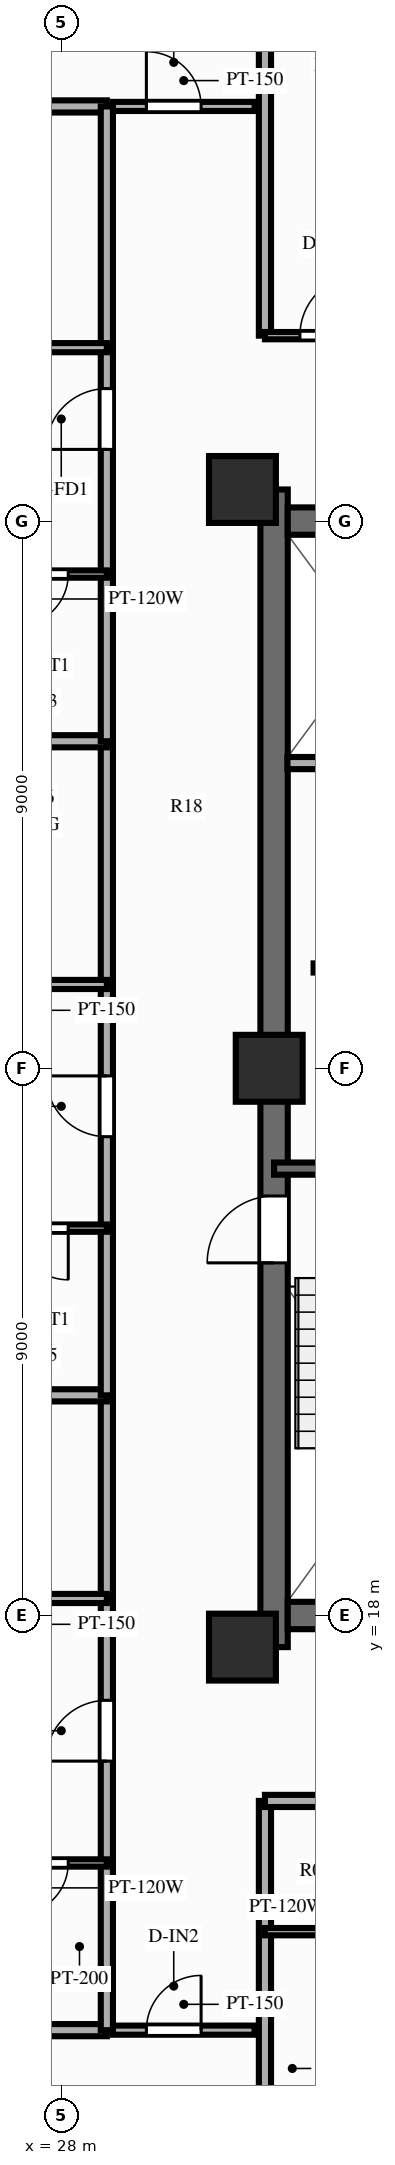
"""IFC4 building model, lengths in metres.
Left out: names, types, materials, properties, quantities, classifications, styles, units other than length and angle.
Written with IfcOpenShell. Run it as: python <this file> out.ifc"""

import sys

from ifc_helpers import new_model, si_unit, direction, frame, frame_2d, origin, origin_2d, place, context, subcontext, project, spatial, rectangle, extrude, source, transform, mapped, element, fill, save


model = new_model("IFC4")
c1 = context("Model", 3, precision=1e-05, world=origin(), true_north=direction((0.0, 1.0)))
c2 = subcontext(c1, "Body", "Model", "MODEL_VIEW")
j1 = project(units=[si_unit("LENGTHUNIT", "METRE"), si_unit("PLANEANGLEUNIT", "RADIAN")], contexts=[c1])
p1 = place(None, origin())
s1 = spatial("IfcSite", under=j1, at=p1, CompositionType="ELEMENT")
p2 = place(p1, origin())
s2 = spatial("IfcBuilding", under=s1, at=p2, CompositionType="ELEMENT")
p3 = place(p2, frame((0.0, 0.0, 172.9)))
s3 = spatial("IfcBuildingStorey", under=s2, at=p3, CompositionType="ELEMENT", Elevation=172.9)
p4 = place(p3, frame((31.5, 17.48, 0.0), z_axis=(0.0, 0.0, 1.0), x_axis=(0.0, 1.0, 0.0)))
e1 = element("IfcWall", 1, at=p4, inside=s3, PredefinedType="SHEAR", context=c2, shape_type="SweptSolid", body=[
    extrude(rectangle(XDim=19.04, YDim=0.45, at=frame_2d((9.52, 0.0))), origin(), (0.0, 0.0, 1.0), 3.9),
])
p5 = place(p4, frame((6.32, 0.0, 0.0)))
e2 = element("IfcOpeningElement", 2, at=p5, cuts=e1, PredefinedType="OPENING", context=c2, shape_type="SweptSolid", body=[
    extrude(rectangle(XDim=1.1, YDim=2.15, at=frame_2d((0.55, 1.075))), frame((0.0, 0.237, 0.0), z_axis=(0.0, -1.0, 0.0), x_axis=(1.0, 0.0, 0.0)), (0.0, 0.0, 1.0), 0.474),
])
p6 = place(p3, frame((31.725, 18.0, 0.0), z_axis=(0.0, 0.0, 1.0), x_axis=(1.0, 0.0, 0.0)))
e3 = element("IfcWall", 3, at=p6, inside=s3, PredefinedType="SHEAR", context=c2, shape_type="SweptSolid", body=[
    extrude(rectangle(XDim=12.55, YDim=0.45, at=frame_2d((6.275, 0.0))), origin(), (0.0, 0.0, 1.0), 3.9),
])
p7 = place(p3, frame((31.725, 36.0, 0.0), z_axis=(0.0, 0.0, 1.0), x_axis=(1.0, 0.0, 0.0)))
e4 = element("IfcWall", 4, at=p7, inside=s3, PredefinedType="SHEAR", context=c2, shape_type="SweptSolid", body=[
    extrude(rectangle(XDim=12.55, YDim=0.45, at=frame_2d((6.275, 0.0))), origin(), (0.0, 0.0, 1.0), 3.9),
])
p8 = place(p7, frame((5.225, 0.0, 0.0), z_axis=(0.0, 0.0, 1.0), x_axis=(-1.0, 0.0, 0.0)))
e5 = element("IfcOpeningElement", 5, at=p8, cuts=e4, PredefinedType="OPENING", context=c2, shape_type="SweptSolid", body=[
    extrude(rectangle(XDim=1.4, YDim=2.15, at=frame_2d((0.7, 1.075))), frame((0.0, 0.237, 0.0), z_axis=(0.0, -1.0, 0.0), x_axis=(1.0, 0.0, 0.0)), (0.0, 0.0, 1.0), 0.474),
])
m1 = source(origin(), c2, "Body", "SweptSolid", [
    extrude(rectangle(XDim=1.1, YDim=1.1, at=origin_2d()), origin(), (0.0, 0.0, 1.0), 3.9),
])
for number, where, z_axis, x_axis in (
    (6, (30.98, 17.48, 0.0), (0.0, 0.0, 1.0), (1.0, 0.0, 0.0)),
    (7, (30.98, 36.52, 0.0), (0.0, 0.0, 1.0), (1.0, 0.0, 0.0)),
    (8, (31.42, 27.0, 0.0), (0.0, 0.0, 1.0), (1.0, 0.0, 0.0)),
):
    element("IfcColumn", number, at=place(p3, frame(where, z_axis=z_axis, x_axis=x_axis)), inside=s3, PredefinedType="COLUMN", context=c2, shape_type="MappedRepresentation", body=[
        mapped(m1, transform((0.0, 0.0, 0.0), scale=1.0)),
    ])
p9 = place(p3, frame((32.15, 28.65, 0.0), z_axis=(0.0, 0.0, 1.0), x_axis=(1.0, 0.0, 0.0)))
e9 = element("IfcWall", 9, at=p9, inside=s3, PredefinedType="PARTITIONING", context=c2, shape_type="SweptSolid", body=[
    extrude(rectangle(XDim=2.27, YDim=0.15, at=frame_2d((1.135, 0.0))), origin(), (0.0, 0.0, 1.0), 3.04),
])
p10 = place(p3, frame((31.5, 25.35, 0.0), z_axis=(0.0, 0.0, 1.0), x_axis=(1.0, 0.0, 0.0)))
e10 = element("IfcWall", 10, at=p10, inside=s3, PredefinedType="SOLIDWALL", context=c2, shape_type="SweptSolid", body=[
    extrude(rectangle(XDim=3.93, YDim=0.2, at=frame_2d((1.965, 0.0))), origin(), (0.0, 0.0, 1.0), 3.69),
])
p11 = place(p3, frame((31.72, 32.02, 0.0), z_axis=(0.0, 0.0, 1.0), x_axis=(1.0, 0.0, 0.0)))
e11 = element("IfcWall", 11, at=p11, inside=s3, PredefinedType="PARTITIONING", context=c2, shape_type="SweptSolid", body=[
    extrude(rectangle(XDim=2.8, YDim=0.2, at=frame_2d((1.4, 0.0))), origin(), (0.0, 0.0, 1.0), 3.69),
])
p12 = place(p3, frame((28.85, 11.18, 0.0), z_axis=(0.0, 0.0, 1.0), x_axis=(1.0, 0.0, 0.0)))
e12 = element("IfcWall", 12, at=p12, inside=s3, PredefinedType="PARTITIONING", context=c2, shape_type="SweptSolid", body=[
    extrude(rectangle(XDim=2.33, YDim=0.15, at=frame_2d((1.165, 0.0))), origin(), (0.0, 0.0, 1.0), 3.69),
])
p13 = place(p12, frame((0.55, 0.0, 0.0)))
e13 = element("IfcOpeningElement", 13, at=p13, cuts=e12, PredefinedType="OPENING", context=c2, shape_type="SweptSolid", body=[
    extrude(rectangle(XDim=0.9, YDim=2.1, at=frame_2d((0.45, 1.05))), frame((0.0, 0.087, 0.0), z_axis=(0.0, -1.0, 0.0), x_axis=(1.0, 0.0, 0.0)), (0.0, 0.0, 1.0), 0.174),
])
p14 = place(p3, frame((28.85, 42.82, 0.0), z_axis=(0.0, 0.0, 1.0), x_axis=(1.0, 0.0, 0.0)))
e14 = element("IfcWall", 14, at=p14, inside=s3, PredefinedType="PARTITIONING", context=c2, shape_type="SweptSolid", body=[
    extrude(rectangle(XDim=2.33, YDim=0.15, at=frame_2d((1.165, 0.0))), origin(), (0.0, 0.0, 1.0), 3.69),
])
p15 = place(p14, frame((0.55, 0.0, 0.0)))
e15 = element("IfcOpeningElement", 15, at=p15, cuts=e14, PredefinedType="OPENING", context=c2, shape_type="SweptSolid", body=[
    extrude(rectangle(XDim=0.9, YDim=2.1, at=frame_2d((0.45, 1.05))), frame((0.0, 0.087, 0.0), z_axis=(0.0, -1.0, 0.0), x_axis=(1.0, 0.0, 0.0)), (0.0, 0.0, 1.0), 0.174),
])
p16 = place(p3, frame((31.35, 14.95, 0.0), z_axis=(0.0, 0.0, 1.0), x_axis=(0.0, -1.0, 0.0)))
e16 = element("IfcWall", 16, at=p16, inside=s3, PredefinedType="PARTITIONING", context=c2, shape_type="SweptSolid", body=[
    extrude(rectangle(XDim=8.8, YDim=0.2, at=frame_2d((4.4, 0.0))), origin(), (0.0, 0.0, 1.0), 2.79),
])
p17 = place(p3, frame((31.35, 14.95, 0.0), z_axis=(0.0, 0.0, 1.0), x_axis=(1.0, 0.0, 0.0)))
e17 = element("IfcWall", 17, at=p17, inside=s3, PredefinedType="PARTITIONING", context=c2, shape_type="SweptSolid", body=[
    extrude(rectangle(XDim=2.85, YDim=0.2, at=frame_2d((1.425, 0.0))), origin(), (0.0, 0.0, 1.0), 3.69),
])
p18 = place(p3, frame((31.35, 12.8, 0.0), z_axis=(0.0, 0.0, 1.0), x_axis=(1.0, 0.0, 0.0)))
e18 = element("IfcWall", 18, at=p18, inside=s3, PredefinedType="PARTITIONING", context=c2, shape_type="SweptSolid", body=[
    extrude(rectangle(XDim=2.85, YDim=0.12, at=frame_2d((1.425, 0.0))), origin(), (0.0, 0.0, 1.0), 3.69),
])
p19 = place(p3, frame((31.35, 39.05, 0.0), z_axis=(0.0, 0.0, 1.0), x_axis=(0.0, 1.0, 0.0)))
e19 = element("IfcWall", 19, at=p19, inside=s3, PredefinedType="PARTITIONING", context=c2, shape_type="SweptSolid", body=[
    extrude(rectangle(XDim=8.8, YDim=0.2, at=frame_2d((4.4, 0.0))), origin(), (0.0, 0.0, 1.0), 2.79),
])
p20 = place(p3, frame((31.35, 39.05, 0.0), z_axis=(0.0, 0.0, 1.0), x_axis=(1.0, 0.0, 0.0)))
e20 = element("IfcWall", 20, at=p20, inside=s3, PredefinedType="PARTITIONING", context=c2, shape_type="SweptSolid", body=[
    extrude(rectangle(XDim=2.15, YDim=0.12, at=frame_2d((1.075, 0.0))), origin(), (0.0, 0.0, 1.0), 3.69),
])
p21 = place(p20, frame((0.575, 0.0, 0.0)))
e21 = element("IfcOpeningElement", 21, at=p21, cuts=e20, PredefinedType="OPENING", context=c2, shape_type="SweptSolid", body=[
    extrude(rectangle(XDim=1.0, YDim=2.1, at=frame_2d((0.5, 1.05))), frame((0.0, 0.072, 0.0), z_axis=(0.0, -1.0, 0.0), x_axis=(1.0, 0.0, 0.0)), (0.0, 0.0, 1.0), 0.144),
])
for number, where, z_axis, x_axis in (
    (22, (28.75, 11.18, 0.0), (0.0, 0.0, 1.0), (-1.0, 0.0, 0.0)),
    (23, (28.75, 42.82, 0.0), (0.0, 0.0, 1.0), (-1.0, 0.0, 0.0)),
):
    element("IfcWall", number, at=place(p3, frame(where, z_axis=z_axis, x_axis=x_axis)), inside=s3, PredefinedType="PARTITIONING", context=c2, shape_type="SweptSolid", body=[
        extrude(rectangle(XDim=10.85, YDim=0.2, at=frame_2d((5.425, 0.0))), origin(), (0.0, 0.0, 1.0), 3.69),
    ])
p22 = place(p3, frame((28.75, 11.18, 0.0), z_axis=(0.0, 0.0, 1.0), x_axis=(0.0, 1.0, 0.0)))
e24 = element("IfcWall", 24, at=p22, inside=s3, PredefinedType="PARTITIONING", context=c2, shape_type="SweptSolid", body=[
    extrude(rectangle(XDim=2.75, YDim=0.2, at=frame_2d((1.375, 0.0))), origin(), (0.0, 0.0, 1.0), 3.69),
])
p23 = place(p3, frame((28.75, 13.93, 0.0), z_axis=(0.0, 0.0, 1.0), x_axis=(0.0, 1.0, 0.0)))
e25 = element("IfcWall", 25, at=p23, inside=s3, PredefinedType="PARTITIONING", context=c2, shape_type="SweptSolid", body=[
    extrude(rectangle(XDim=4.35, YDim=0.2, at=frame_2d((2.175, 0.0))), origin(), (0.0, 0.0, 1.0), 3.69),
])
p24 = place(p23, frame((1.675, 0.0, 0.0)))
e26 = element("IfcOpeningElement", 26, at=p24, cuts=e25, PredefinedType="OPENING", context=c2, shape_type="SweptSolid", body=[
    extrude(rectangle(XDim=1.0, YDim=2.15, at=frame_2d((0.5, 1.075))), frame((0.0, 0.112, 0.0), z_axis=(0.0, -1.0, 0.0), x_axis=(1.0, 0.0, 0.0)), (0.0, 0.0, 1.0), 0.224),
])
p25 = place(p3, frame((28.75, 18.28, 0.0), z_axis=(0.0, 0.0, 1.0), x_axis=(0.0, 1.0, 0.0)))
e27 = element("IfcWall", 27, at=p25, inside=s3, PredefinedType="PARTITIONING", context=c2, shape_type="SweptSolid", body=[
    extrude(rectangle(XDim=3.341, YDim=0.2, at=frame_2d((1.67, 0.0))), origin(), (0.0, 0.0, 1.0), 3.69),
])
p26 = place(p3, frame((28.75, 13.93, 0.0), z_axis=(0.0, 0.0, 1.0), x_axis=(-1.0, 0.0, 0.0)))
e28 = element("IfcWall", 28, at=p26, inside=s3, PredefinedType="PARTITIONING", context=c2, shape_type="SweptSolid", body=[
    extrude(rectangle(XDim=2.12, YDim=0.12, at=frame_2d((1.06, 0.0))), origin(), (0.0, 0.0, 1.0), 3.69),
])
p27 = place(p26, frame((0.635, 0.0, 0.0)))
e29 = element("IfcOpeningElement", 29, at=p27, cuts=e28, PredefinedType="OPENING", context=c2, shape_type="SweptSolid", body=[
    extrude(rectangle(XDim=0.85, YDim=2.05, at=frame_2d((0.425, 1.025))), frame((0.0, 0.072, 0.0), z_axis=(0.0, -1.0, 0.0), x_axis=(1.0, 0.0, 0.0)), (0.0, 0.0, 1.0), 0.144),
])
p28 = place(p3, frame((28.75, 18.28, 0.0), z_axis=(0.0, 0.0, 1.0), x_axis=(-1.0, 0.0, 0.0)))
e30 = element("IfcWall", 30, at=p28, inside=s3, PredefinedType="PARTITIONING", context=c2, shape_type="SweptSolid", body=[
    extrude(rectangle(XDim=3.1, YDim=0.15, at=frame_2d((1.55, 0.0))), origin(), (0.0, 0.0, 1.0), 3.69),
])
p29 = place(p28, frame((1.1, 0.0, 0.0)))
e31 = element("IfcOpeningElement", 31, at=p29, cuts=e30, PredefinedType="OPENING", context=c2, shape_type="SweptSolid", body=[
    extrude(rectangle(XDim=0.9, YDim=2.1, at=frame_2d((0.45, 1.05))), frame((0.0, 0.087, 0.0), z_axis=(0.0, -1.0, 0.0), x_axis=(1.0, 0.0, 0.0)), (0.0, 0.0, 1.0), 0.174),
])
p30 = place(p3, frame((28.75, 21.621, 0.0), z_axis=(0.0, 0.0, 1.0), x_axis=(-1.0, 0.0, 0.0)))
e32 = element("IfcWall", 32, at=p30, inside=s3, PredefinedType="PARTITIONING", context=c2, shape_type="SweptSolid", body=[
    extrude(rectangle(XDim=10.85, YDim=0.2, at=frame_2d((5.425, 0.0))), origin(), (0.0, 0.0, 1.0), 3.29),
])
p31 = place(p3, frame((28.75, 21.621, 0.0), z_axis=(0.0, 0.0, 1.0), x_axis=(0.0, 1.0, 0.0)))
e33 = element("IfcWall", 33, at=p31, inside=s3, PredefinedType="PARTITIONING", context=c2, shape_type="SweptSolid", body=[
    extrude(rectangle(XDim=2.75, YDim=0.2, at=frame_2d((1.375, 0.0))), origin(), (0.0, 0.0, 1.0), 3.69),
])
p32 = place(p3, frame((28.75, 24.371, 0.0), z_axis=(0.0, 0.0, 1.0), x_axis=(0.0, 1.0, 0.0)))
e34 = element("IfcWall", 34, at=p32, inside=s3, PredefinedType="PARTITIONING", context=c2, shape_type="SweptSolid", body=[
    extrude(rectangle(XDim=4.008, YDim=0.2, at=frame_2d((2.004, 0.0))), origin(), (0.0, 0.0, 1.0), 3.69),
])
p33 = place(p32, frame((1.504, 0.0, 0.0)))
e35 = element("IfcOpeningElement", 35, at=p33, cuts=e34, PredefinedType="OPENING", context=c2, shape_type="SweptSolid", body=[
    extrude(rectangle(XDim=1.0, YDim=2.15, at=frame_2d((0.5, 1.075))), frame((0.0, 0.112, 0.0), z_axis=(0.0, -1.0, 0.0), x_axis=(1.0, 0.0, 0.0)), (0.0, 0.0, 1.0), 0.224),
])
p34 = place(p3, frame((28.75, 28.379, 0.0), z_axis=(0.0, 0.0, 1.0), x_axis=(0.0, 1.0, 0.0)))
e36 = element("IfcWall", 36, at=p34, inside=s3, PredefinedType="PARTITIONING", context=c2, shape_type="SweptSolid", body=[
    extrude(rectangle(XDim=4.0, YDim=0.2, at=frame_2d((2.0, 0.0))), origin(), (0.0, 0.0, 1.0), 3.69),
])
p35 = place(p3, frame((28.75, 24.371, 0.0), z_axis=(0.0, 0.0, 1.0), x_axis=(-1.0, 0.0, 0.0)))
e37 = element("IfcWall", 37, at=p35, inside=s3, PredefinedType="PARTITIONING", context=c2, shape_type="SweptSolid", body=[
    extrude(rectangle(XDim=2.12, YDim=0.12, at=frame_2d((1.06, 0.0))), origin(), (0.0, 0.0, 1.0), 3.69),
])
p36 = place(p35, frame((0.635, 0.0, 0.0)))
e38 = element("IfcOpeningElement", 38, at=p36, cuts=e37, PredefinedType="OPENING", context=c2, shape_type="SweptSolid", body=[
    extrude(rectangle(XDim=0.85, YDim=2.05, at=frame_2d((0.425, 1.025))), frame((0.0, 0.072, 0.0), z_axis=(0.0, -1.0, 0.0), x_axis=(1.0, 0.0, 0.0)), (0.0, 0.0, 1.0), 0.144),
])
p37 = place(p3, frame((28.75, 28.379, 0.0), z_axis=(0.0, 0.0, 1.0), x_axis=(-1.0, 0.0, 0.0)))
e39 = element("IfcWall", 39, at=p37, inside=s3, PredefinedType="PARTITIONING", context=c2, shape_type="SweptSolid", body=[
    extrude(rectangle(XDim=3.1, YDim=0.15, at=frame_2d((1.55, 0.0))), origin(), (0.0, 0.0, 1.0), 3.69),
])
p38 = place(p37, frame((1.1, 0.0, 0.0)))
e40 = element("IfcOpeningElement", 40, at=p38, cuts=e39, PredefinedType="OPENING", context=c2, shape_type="SweptSolid", body=[
    extrude(rectangle(XDim=0.9, YDim=2.1, at=frame_2d((0.45, 1.05))), frame((0.0, 0.087, 0.0), z_axis=(0.0, -1.0, 0.0), x_axis=(1.0, 0.0, 0.0)), (0.0, 0.0, 1.0), 0.174),
])
p39 = place(p3, frame((28.75, 32.379, 0.0), z_axis=(0.0, 0.0, 1.0), x_axis=(-1.0, 0.0, 0.0)))
e41 = element("IfcWall", 41, at=p39, inside=s3, PredefinedType="PARTITIONING", context=c2, shape_type="SweptSolid", body=[
    extrude(rectangle(XDim=10.85, YDim=0.2, at=frame_2d((5.425, 0.0))), origin(), (0.0, 0.0, 1.0), 3.29),
])
p40 = place(p3, frame((28.75, 32.379, 0.0), z_axis=(0.0, 0.0, 1.0), x_axis=(0.0, 1.0, 0.0)))
e42 = element("IfcWall", 42, at=p40, inside=s3, PredefinedType="PARTITIONING", context=c2, shape_type="SweptSolid", body=[
    extrude(rectangle(XDim=2.75, YDim=0.2, at=frame_2d((1.375, 0.0))), origin(), (0.0, 0.0, 1.0), 3.69),
])
p41 = place(p3, frame((28.75, 35.129, 0.0), z_axis=(0.0, 0.0, 1.0), x_axis=(0.0, 1.0, 0.0)))
e43 = element("IfcWall", 43, at=p41, inside=s3, PredefinedType="PARTITIONING", context=c2, shape_type="SweptSolid", body=[
    extrude(rectangle(XDim=3.723, YDim=0.2, at=frame_2d((1.862, 0.0))), origin(), (0.0, 0.0, 1.0), 3.69),
])
p42 = place(p41, frame((2.05, 0.0, 0.0)))
e44 = element("IfcOpeningElement", 44, at=p42, cuts=e43, PredefinedType="OPENING", context=c2, shape_type="SweptSolid", body=[
    extrude(rectangle(XDim=1.0, YDim=2.15, at=frame_2d((0.5, 1.075))), frame((0.0, 0.112, 0.0), z_axis=(0.0, -1.0, 0.0), x_axis=(1.0, 0.0, 0.0)), (0.0, 0.0, 1.0), 0.224),
])
p43 = place(p3, frame((28.75, 38.852, 0.0), z_axis=(0.0, 0.0, 1.0), x_axis=(0.0, 1.0, 0.0)))
e45 = element("IfcWall", 45, at=p43, inside=s3, PredefinedType="PARTITIONING", context=c2, shape_type="SweptSolid", body=[
    extrude(rectangle(XDim=3.968, YDim=0.2, at=frame_2d((1.984, 0.0))), origin(), (0.0, 0.0, 1.0), 3.69),
])
p44 = place(p3, frame((28.75, 35.129, 0.0), z_axis=(0.0, 0.0, 1.0), x_axis=(-1.0, 0.0, 0.0)))
e46 = element("IfcWall", 46, at=p44, inside=s3, PredefinedType="PARTITIONING", context=c2, shape_type="SweptSolid", body=[
    extrude(rectangle(XDim=2.12, YDim=0.12, at=frame_2d((1.06, 0.0))), origin(), (0.0, 0.0, 1.0), 3.69),
])
p45 = place(p44, frame((0.635, 0.0, 0.0)))
e47 = element("IfcOpeningElement", 47, at=p45, cuts=e46, PredefinedType="OPENING", context=c2, shape_type="SweptSolid", body=[
    extrude(rectangle(XDim=0.85, YDim=2.05, at=frame_2d((0.425, 1.025))), frame((0.0, 0.072, 0.0), z_axis=(0.0, -1.0, 0.0), x_axis=(1.0, 0.0, 0.0)), (0.0, 0.0, 1.0), 0.144),
])
p46 = place(p3, frame((28.75, 38.852, 0.0), z_axis=(0.0, 0.0, 1.0), x_axis=(-1.0, 0.0, 0.0)))
e48 = element("IfcWall", 48, at=p46, inside=s3, PredefinedType="PARTITIONING", context=c2, shape_type="SweptSolid", body=[
    extrude(rectangle(XDim=3.1, YDim=0.15, at=frame_2d((1.55, 0.0))), origin(), (0.0, 0.0, 1.0), 3.69),
])
p47 = place(p46, frame((1.1, 0.0, 0.0)))
e49 = element("IfcOpeningElement", 49, at=p47, cuts=e48, PredefinedType="OPENING", context=c2, shape_type="SweptSolid", body=[
    extrude(rectangle(XDim=0.9, YDim=2.1, at=frame_2d((0.45, 1.05))), frame((0.0, 0.087, 0.0), z_axis=(0.0, -1.0, 0.0), x_axis=(1.0, 0.0, 0.0)), (0.0, 0.0, 1.0), 0.174),
])
m2 = source(origin(), c2, "Body", "SweptSolid", [
    extrude(rectangle(XDim=1.1, YDim=2.15, at=frame_2d((0.55, 1.075))), frame((0.0, 0.025, 0.0), z_axis=(0.0, -1.0, 0.0), x_axis=(1.0, 0.0, 0.0)), (0.0, 0.0, 1.0), 0.05),
])
p48 = place(p5, origin())
e50 = element("IfcDoor", 50, at=p48, inside=s3, OperationType="SINGLE_SWING_LEFT", PredefinedType="DOOR", context=c2, shape_type="MappedRepresentation", body=[
    mapped(m2, transform((0.0, 0.0, 0.0), scale=1.0)),
])
fill(e2, e50)
m3 = source(origin(), c2, "Body", "SweptSolid", [
    extrude(rectangle(XDim=0.9, YDim=2.1, at=frame_2d((0.45, 1.05))), frame((0.0, 0.025, 0.0), z_axis=(0.0, -1.0, 0.0), x_axis=(1.0, 0.0, 0.0)), (0.0, 0.0, 1.0), 0.05),
])
p49 = place(p13, origin())
e51 = element("IfcDoor", 51, at=p49, inside=s3, OperationType="SINGLE_SWING_RIGHT", PredefinedType="DOOR", context=c2, shape_type="MappedRepresentation", body=[
    mapped(m3, transform((0.0, 0.0, 0.0), scale=1.0)),
])
fill(e13, e51)
p50 = place(p15, origin())
e52 = element("IfcDoor", 52, at=p50, inside=s3, OperationType="SINGLE_SWING_LEFT", PredefinedType="DOOR", context=c2, shape_type="MappedRepresentation", body=[
    mapped(m3, transform((0.0, 0.0, 0.0), scale=1.0)),
])
fill(e15, e52)
m4 = source(origin(), c2, "Body", "SweptSolid", [
    extrude(rectangle(XDim=1.0, YDim=2.1, at=frame_2d((0.5, 1.05))), frame((0.0, 0.025, 0.0), z_axis=(0.0, -1.0, 0.0), x_axis=(1.0, 0.0, 0.0)), (0.0, 0.0, 1.0), 0.05),
])
p51 = place(p21, origin())
e53 = element("IfcDoor", 53, at=p51, inside=s3, OperationType="SINGLE_SWING_RIGHT", PredefinedType="DOOR", context=c2, shape_type="MappedRepresentation", body=[
    mapped(m4, transform((0.0, 0.0, 0.0), scale=1.0)),
])
fill(e21, e53)
m5 = source(origin(), c2, "Body", "SweptSolid", [
    extrude(rectangle(XDim=1.0, YDim=2.15, at=frame_2d((0.5, 1.075))), frame((0.0, 0.025, 0.0), z_axis=(0.0, -1.0, 0.0), x_axis=(1.0, 0.0, 0.0)), (0.0, 0.0, 1.0), 0.05),
])
p52 = place(p24, origin())
e54 = element("IfcDoor", 54, at=p52, inside=s3, OperationType="SINGLE_SWING_LEFT", PredefinedType="DOOR", context=c2, shape_type="MappedRepresentation", body=[
    mapped(m5, transform((0.0, 0.0, 0.0), scale=1.0)),
])
fill(e26, e54)
m6 = source(origin(), c2, "Body", "SweptSolid", [
    extrude(rectangle(XDim=0.85, YDim=2.05, at=frame_2d((0.425, 1.025))), frame((0.0, 0.025, 0.0), z_axis=(0.0, -1.0, 0.0), x_axis=(1.0, 0.0, 0.0)), (0.0, 0.0, 1.0), 0.05),
])
p53 = place(p27, origin())
e55 = element("IfcDoor", 55, at=p53, inside=s3, OperationType="SINGLE_SWING_RIGHT", PredefinedType="DOOR", context=c2, shape_type="MappedRepresentation", body=[
    mapped(m6, transform((0.0, 0.0, 0.0), scale=1.0)),
])
fill(e29, e55)
p54 = place(p33, origin())
e56 = element("IfcDoor", 56, at=p54, inside=s3, OperationType="SINGLE_SWING_RIGHT", PredefinedType="DOOR", context=c2, shape_type="MappedRepresentation", body=[
    mapped(m5, transform((0.0, 0.0, 0.0), scale=1.0)),
])
fill(e35, e56)
p55 = place(p36, origin())
e57 = element("IfcDoor", 57, at=p55, inside=s3, OperationType="SINGLE_SWING_LEFT", PredefinedType="DOOR", context=c2, shape_type="MappedRepresentation", body=[
    mapped(m6, transform((0.0, 0.0, 0.0), scale=1.0)),
])
fill(e38, e57)
p56 = place(p42, origin())
e58 = element("IfcDoor", 58, at=p56, inside=s3, OperationType="SINGLE_SWING_LEFT", PredefinedType="DOOR", context=c2, shape_type="MappedRepresentation", body=[
    mapped(m5, transform((0.0, 0.0, 0.0), scale=1.0)),
])
fill(e44, e58)
p57 = place(p45, origin())
e59 = element("IfcDoor", 59, at=p57, inside=s3, OperationType="SINGLE_SWING_RIGHT", PredefinedType="DOOR", context=c2, shape_type="MappedRepresentation", body=[
    mapped(m6, transform((0.0, 0.0, 0.0), scale=1.0)),
])
fill(e47, e59)
save(model, sys.argv[1])
